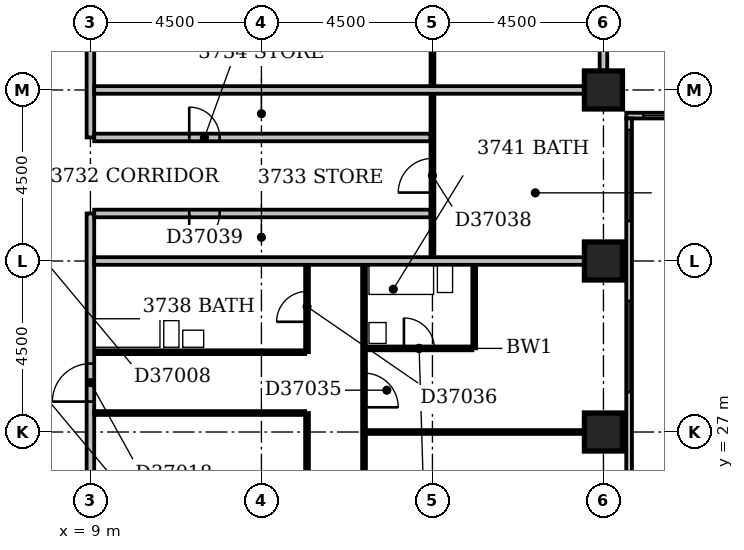
"""IFC4 building model, lengths in metres.
Left out: names, types, materials, properties, quantities, classifications, styles, units other than length and angle.
Written with IfcOpenShell. Run it as: python <this file> out.ifc"""

import sys

from ifc_helpers import new_model, si_unit, direction, frame, frame_2d, origin, origin_2d, place, context, subcontext, project, spatial, rectangle, extrude, element, fill, save


model = new_model("IFC4")
c1 = context("Model", 3, precision=1e-05, world=origin(), true_north=direction((0.0, 1.0)))
c2 = subcontext(c1, "Body", "Model", "MODEL_VIEW")
j1 = project(units=[si_unit("LENGTHUNIT", "METRE"), si_unit("PLANEANGLEUNIT", "RADIAN")], contexts=[c1])
p1 = place(None, origin())
s1 = spatial("IfcSite", under=j1, at=p1, CompositionType="ELEMENT")
p2 = place(p1, origin())
s2 = spatial("IfcBuilding", under=s1, at=p2, CompositionType="ELEMENT")
p3 = place(p2, frame((0.0, 0.0, 148.4)))
s3 = spatial("IfcBuildingStorey", under=s2, at=p3, CompositionType="ELEMENT", Elevation=148.4)
for number, where, z_axis, x_axis in (
    (1, (22.5, 27.0, -0.3), (0.0, 0.0, 1.0), (1.0, 0.0, 0.0)),
    (2, (22.5, 31.5, -0.3), (0.0, 0.0, 1.0), (1.0, 0.0, 0.0)),
    (3, (22.5, 36.0, -0.3), (0.0, 0.0, 1.0), (1.0, 0.0, 0.0)),
):
    element("IfcColumn", number, at=place(p3, frame(where, z_axis=z_axis, x_axis=x_axis)), inside=s3, PredefinedType="COLUMN", context=c2, shape_type="SweptSolid", body=[
        extrude(rectangle(XDim=1.0, YDim=1.0, at=origin_2d()), origin(), (0.0, 0.0, 1.0), 3.6),
    ])
p4 = place(p3, frame((23.175, 17.4, 0.0), z_axis=(0.0, 0.0, 1.0), x_axis=(0.0, 1.0, 0.0)))
e4 = element("IfcWall", 4, at=p4, inside=s3, PredefinedType="STANDARD", context=c2, shape_type="SweptSolid", body=[
    extrude(rectangle(XDim=17.85, YDim=0.15, at=frame_2d((8.925, 0.0))), origin(), (0.0, 0.0, 1.0), 2.7),
])
p5 = place(p4, frame((1.65, 0.0, 0.6)))
e5 = element("IfcOpeningElement", 5, at=p5, cuts=e4, PredefinedType="OPENING", context=c2, shape_type="SweptSolid", body=[
    extrude(rectangle(XDim=2.4, YDim=1.8, at=frame_2d((1.2, 0.9))), frame((0.0, 0.087, 0.0), z_axis=(0.0, -1.0, 0.0), x_axis=(1.0, 0.0, 0.0)), (0.0, 0.0, 1.0), 0.174),
])
p6 = place(p4, frame((5.848, 0.0, 0.6)))
e6 = element("IfcOpeningElement", 6, at=p6, cuts=e4, PredefinedType="OPENING", context=c2, shape_type="SweptSolid", body=[
    extrude(rectangle(XDim=0.9, YDim=1.8, at=frame_2d((0.45, 0.9))), frame((0.0, 0.087, 0.0), z_axis=(0.0, -1.0, 0.0), x_axis=(1.0, 0.0, 0.0)), (0.0, 0.0, 1.0), 0.174),
])
p7 = place(p4, frame((10.65, 0.0, 0.6)))
e7 = element("IfcOpeningElement", 7, at=p7, cuts=e4, PredefinedType="OPENING", context=c2, shape_type="SweptSolid", body=[
    extrude(rectangle(XDim=2.4, YDim=1.8, at=frame_2d((1.2, 0.9))), frame((0.0, 0.087, 0.0), z_axis=(0.0, -1.0, 0.0), x_axis=(1.0, 0.0, 0.0)), (0.0, 0.0, 1.0), 0.174),
])
p8 = place(p4, frame((15.15, 0.0, 0.6)))
e8 = element("IfcOpeningElement", 8, at=p8, cuts=e4, PredefinedType="OPENING", context=c2, shape_type="SweptSolid", body=[
    extrude(rectangle(XDim=2.4, YDim=1.8, at=frame_2d((1.2, 0.9))), frame((0.0, 0.087, 0.0), z_axis=(0.0, -1.0, 0.0), x_axis=(1.0, 0.0, 0.0)), (0.0, 0.0, 1.0), 0.174),
])
p9 = place(p3, frame((23.1, 35.325, 0.0), z_axis=(0.0, 0.0, 1.0), x_axis=(1.0, 0.0, 0.0)))
e9 = element("IfcWall", 9, at=p9, inside=s3, PredefinedType="STANDARD", context=c2, shape_type="SweptSolid", body=[
    extrude(rectangle(XDim=45.15, YDim=0.15, at=frame_2d((22.575, 0.0))), origin(), (0.0, 0.0, 1.0), 2.7),
])
p10 = place(p9, frame((0.45, 0.0, 0.6)))
e10 = element("IfcOpeningElement", 10, at=p10, cuts=e9, PredefinedType="OPENING", context=c2, shape_type="SweptSolid", body=[
    extrude(rectangle(XDim=2.4, YDim=1.8, at=frame_2d((1.2, 0.9))), frame((0.0, 0.087, 0.0), z_axis=(0.0, -1.0, 0.0), x_axis=(1.0, 0.0, 0.0)), (0.0, 0.0, 1.0), 0.174),
])
p11 = place(p9, frame((6.711, 0.0, 0.6)))
e11 = element("IfcOpeningElement", 11, at=p11, cuts=e9, PredefinedType="OPENING", context=c2, shape_type="SweptSolid", body=[
    extrude(rectangle(XDim=0.9, YDim=1.8, at=frame_2d((0.45, 0.9))), frame((0.0, 0.087, 0.0), z_axis=(0.0, -1.0, 0.0), x_axis=(1.0, 0.0, 0.0)), (0.0, 0.0, 1.0), 0.174),
])
p12 = place(p9, frame((9.45, 0.0, 0.6)))
e12 = element("IfcOpeningElement", 12, at=p12, cuts=e9, PredefinedType="OPENING", context=c2, shape_type="SweptSolid", body=[
    extrude(rectangle(XDim=2.4, YDim=1.8, at=frame_2d((1.2, 0.9))), frame((0.0, 0.087, 0.0), z_axis=(0.0, -1.0, 0.0), x_axis=(1.0, 0.0, 0.0)), (0.0, 0.0, 1.0), 0.174),
])
p13 = place(p9, frame((13.95, 0.0, 0.6)))
e13 = element("IfcOpeningElement", 13, at=p13, cuts=e9, PredefinedType="OPENING", context=c2, shape_type="SweptSolid", body=[
    extrude(rectangle(XDim=2.4, YDim=1.8, at=frame_2d((1.2, 0.9))), frame((0.0, 0.087, 0.0), z_axis=(0.0, -1.0, 0.0), x_axis=(1.0, 0.0, 0.0)), (0.0, 0.0, 1.0), 0.174),
])
p14 = place(p9, frame((18.153, 0.0, 0.6)))
e14 = element("IfcOpeningElement", 14, at=p14, cuts=e9, PredefinedType="OPENING", context=c2, shape_type="SweptSolid", body=[
    extrude(rectangle(XDim=1.5, YDim=1.8, at=frame_2d((0.75, 0.9))), frame((0.0, 0.087, 0.0), z_axis=(0.0, -1.0, 0.0), x_axis=(1.0, 0.0, 0.0)), (0.0, 0.0, 1.0), 0.174),
])
p15 = place(p9, frame((22.95, 0.0, 0.6)))
e15 = element("IfcOpeningElement", 15, at=p15, cuts=e9, PredefinedType="OPENING", context=c2, shape_type="SweptSolid", body=[
    extrude(rectangle(XDim=2.4, YDim=1.8, at=frame_2d((1.2, 0.9))), frame((0.0, 0.087, 0.0), z_axis=(0.0, -1.0, 0.0), x_axis=(1.0, 0.0, 0.0)), (0.0, 0.0, 1.0), 0.174),
])
p16 = place(p9, frame((27.45, 0.0, 0.6)))
e16 = element("IfcOpeningElement", 16, at=p16, cuts=e9, PredefinedType="OPENING", context=c2, shape_type="SweptSolid", body=[
    extrude(rectangle(XDim=2.4, YDim=1.8, at=frame_2d((1.2, 0.9))), frame((0.0, 0.087, 0.0), z_axis=(0.0, -1.0, 0.0), x_axis=(1.0, 0.0, 0.0)), (0.0, 0.0, 1.0), 0.174),
])
p17 = place(p9, frame((31.689, 0.0, 0.6)))
e17 = element("IfcOpeningElement", 17, at=p17, cuts=e9, PredefinedType="OPENING", context=c2, shape_type="SweptSolid", body=[
    extrude(rectangle(XDim=1.2, YDim=1.8, at=frame_2d((0.6, 0.9))), frame((0.0, 0.087, 0.0), z_axis=(0.0, -1.0, 0.0), x_axis=(1.0, 0.0, 0.0)), (0.0, 0.0, 1.0), 0.174),
])
p18 = place(p9, frame((36.45, 0.0, 0.6)))
e18 = element("IfcOpeningElement", 18, at=p18, cuts=e9, PredefinedType="OPENING", context=c2, shape_type="SweptSolid", body=[
    extrude(rectangle(XDim=2.4, YDim=1.8, at=frame_2d((1.2, 0.9))), frame((0.0, 0.087, 0.0), z_axis=(0.0, -1.0, 0.0), x_axis=(1.0, 0.0, 0.0)), (0.0, 0.0, 1.0), 0.174),
])
p19 = place(p9, frame((40.95, 0.0, 0.6)))
e19 = element("IfcOpeningElement", 19, at=p19, cuts=e9, PredefinedType="OPENING", context=c2, shape_type="SweptSolid", body=[
    extrude(rectangle(XDim=2.4, YDim=1.8, at=frame_2d((1.2, 0.9))), frame((0.0, 0.087, 0.0), z_axis=(0.0, -1.0, 0.0), x_axis=(1.0, 0.0, 0.0)), (0.0, 0.0, 1.0), 0.174),
])
p20 = place(p3, frame((9.0, 5.0, 0.0), z_axis=(0.0, 0.0, 1.0), x_axis=(0.0, 1.0, 0.0)))
e20 = element("IfcWall", 20, at=p20, inside=s3, PredefinedType="PARTITIONING", context=c2, shape_type="SweptSolid", body=[
    extrude(rectangle(XDim=27.75, YDim=0.2, at=frame_2d((13.875, 0.0))), origin(), (0.0, 0.0, 1.0), 3.3),
])
p21 = place(p20, frame((22.8, 0.0, 0.0)))
e21 = element("IfcOpeningElement", 21, at=p21, cuts=e20, PredefinedType="OPENING", context=c2, shape_type="SweptSolid", body=[
    extrude(rectangle(XDim=1.0, YDim=2.1, at=frame_2d((0.5, 1.05))), frame((0.0, 0.112, 0.0), z_axis=(0.0, -1.0, 0.0), x_axis=(1.0, 0.0, 0.0)), (0.0, 0.0, 1.0), 0.224),
])
p22 = place(p20, frame((14.95, 0.0, 0.0)))
e22 = element("IfcOpeningElement", 22, at=p22, cuts=e20, PredefinedType="OPENING", context=c2, shape_type="SweptSolid", body=[
    extrude(rectangle(XDim=1.0, YDim=2.1, at=frame_2d((0.5, 1.05))), frame((0.0, 0.112, 0.0), z_axis=(0.0, -1.0, 0.0), x_axis=(1.0, 0.0, 0.0)), (0.0, 0.0, 1.0), 0.224),
])
p23 = place(p20, frame((10.45, 0.0, 0.0)))
e23 = element("IfcOpeningElement", 23, at=p23, cuts=e20, PredefinedType="OPENING", context=c2, shape_type="SweptSolid", body=[
    extrude(rectangle(XDim=1.0, YDim=2.1, at=frame_2d((0.5, 1.05))), frame((0.0, 0.112, 0.0), z_axis=(0.0, -1.0, 0.0), x_axis=(1.0, 0.0, 0.0)), (0.0, 0.0, 1.0), 0.224),
])
p24 = place(p20, frame((5.95, 0.0, 0.0)))
e24 = element("IfcOpeningElement", 24, at=p24, cuts=e20, PredefinedType="OPENING", context=c2, shape_type="SweptSolid", body=[
    extrude(rectangle(XDim=1.0, YDim=2.1, at=frame_2d((0.5, 1.05))), frame((0.0, 0.112, 0.0), z_axis=(0.0, -1.0, 0.0), x_axis=(1.0, 0.0, 0.0)), (0.0, 0.0, 1.0), 0.224),
])
p25 = place(p20, frame((1.5, 0.0, 0.0)))
e25 = element("IfcOpeningElement", 25, at=p25, cuts=e20, PredefinedType="OPENING", context=c2, shape_type="SweptSolid", body=[
    extrude(rectangle(XDim=0.9, YDim=2.1, at=frame_2d((0.45, 1.05))), frame((0.0, 0.112, 0.0), z_axis=(0.0, -1.0, 0.0), x_axis=(1.0, 0.0, 0.0)), (0.0, 0.0, 1.0), 0.224),
])
p26 = place(p3, frame((14.7, 22.6, 0.0), z_axis=(0.0, 0.0, 1.0), x_axis=(0.0, 1.0, 0.0)))
e26 = element("IfcWall", 26, at=p26, inside=s3, PredefinedType="PARTITIONING", context=c2, shape_type="SweptSolid", body=[
    extrude(rectangle(XDim=4.9, YDim=0.1, at=frame_2d((2.45, 0.0))), origin(), (0.0, 0.0, 1.0), 3.3),
])
p27 = place(p26, frame((1.95, 0.0, 0.0)))
e27 = element("IfcOpeningElement", 27, at=p27, cuts=e26, PredefinedType="OPENING", context=c2, shape_type="SweptSolid", body=[
    extrude(rectangle(XDim=0.9, YDim=2.1, at=frame_2d((0.45, 1.05))), frame((0.0, 0.062, 0.0), z_axis=(0.0, -1.0, 0.0), x_axis=(1.0, 0.0, 0.0)), (0.0, 0.0, 1.0), 0.124),
])
p28 = place(p3, frame((16.2, 22.6, 0.0), z_axis=(0.0, 0.0, 1.0), x_axis=(0.0, 1.0, 0.0)))
e28 = element("IfcWall", 28, at=p28, inside=s3, PredefinedType="PARTITIONING", context=c2, shape_type="SweptSolid", body=[
    extrude(rectangle(XDim=8.8, YDim=0.1, at=frame_2d((4.4, 0.0))), origin(), (0.0, 0.0, 1.0), 3.3),
])
p29 = place(p28, frame((1.7, 0.0, 0.0)))
e29 = element("IfcOpeningElement", 29, at=p29, cuts=e28, PredefinedType="OPENING", context=c2, shape_type="SweptSolid", body=[
    extrude(rectangle(XDim=0.9, YDim=2.1, at=frame_2d((0.45, 1.05))), frame((0.0, 0.062, 0.0), z_axis=(0.0, -1.0, 0.0), x_axis=(1.0, 0.0, 0.0)), (0.0, 0.0, 1.0), 0.124),
])
p30 = place(p28, frame((5.05, 0.0, 0.0)))
e30 = element("IfcOpeningElement", 30, at=p30, cuts=e28, PredefinedType="OPENING", context=c2, shape_type="SweptSolid", body=[
    extrude(rectangle(XDim=0.9, YDim=2.1, at=frame_2d((0.45, 1.05))), frame((0.0, 0.062, 0.0), z_axis=(0.0, -1.0, 0.0), x_axis=(1.0, 0.0, 0.0)), (0.0, 0.0, 1.0), 0.124),
])
p31 = place(p3, frame((16.25, 27.0, 0.0), z_axis=(0.0, 0.0, 1.0), x_axis=(1.0, 0.0, 0.0)))
e31 = element("IfcWall", 31, at=p31, inside=s3, PredefinedType="PARTITIONING", context=c2, shape_type="SweptSolid", body=[
    extrude(rectangle(XDim=5.75, YDim=0.1, at=frame_2d((2.875, 0.0))), origin(), (0.0, 0.0, 1.0), 2.7),
])
p32 = place(p3, frame((9.1, 27.5, 0.0), z_axis=(0.0, 0.0, 1.0), x_axis=(1.0, 0.0, 0.0)))
e32 = element("IfcWall", 32, at=p32, inside=s3, PredefinedType="PARTITIONING", context=c2, shape_type="SweptSolid", body=[
    extrude(rectangle(XDim=5.55, YDim=0.1, at=frame_2d((2.775, 0.0))), origin(), (0.0, 0.0, 1.0), 2.7),
])
p33 = place(p3, frame((9.1, 29.1, 0.0), z_axis=(0.0, 0.0, 1.0), x_axis=(1.0, 0.0, 0.0)))
e33 = element("IfcWall", 33, at=p33, inside=s3, PredefinedType="PLUMBINGWALL", context=c2, shape_type="SweptSolid", body=[
    extrude(rectangle(XDim=5.55, YDim=0.1, at=frame_2d((2.775, 0.0))), origin(), (0.0, 0.0, 1.0), 3.3),
])
p34 = place(p3, frame((14.7, 29.1, 0.0), z_axis=(0.0, 0.0, 1.0), x_axis=(0.0, 1.0, 0.0)))
e34 = element("IfcWall", 34, at=p34, inside=s3, PredefinedType="PARTITIONING", context=c2, shape_type="SweptSolid", body=[
    extrude(rectangle(XDim=2.3, YDim=0.1, at=frame_2d((1.15, 0.0))), origin(), (0.0, 0.0, 1.0), 3.3),
])
p35 = place(p34, frame((0.8, 0.0, 0.0)))
e35 = element("IfcOpeningElement", 35, at=p35, cuts=e34, PredefinedType="OPENING", context=c2, shape_type="SweptSolid", body=[
    extrude(rectangle(XDim=0.8, YDim=2.1, at=frame_2d((0.4, 1.05))), frame((0.0, 0.062, 0.0), z_axis=(0.0, -1.0, 0.0), x_axis=(1.0, 0.0, 0.0)), (0.0, 0.0, 1.0), 0.124),
])
p36 = place(p3, frame((16.25, 29.2, 0.0), z_axis=(0.0, 0.0, 1.0), x_axis=(1.0, 0.0, 0.0)))
e36 = element("IfcWall", 36, at=p36, inside=s3, PredefinedType="PLUMBINGWALL", context=c2, shape_type="SweptSolid", body=[
    extrude(rectangle(XDim=2.8, YDim=0.1, at=frame_2d((1.4, 0.0))), origin(), (0.0, 0.0, 1.0), 3.3),
])
p37 = place(p36, frame((1.0, 0.0, 0.0)))
e37 = element("IfcOpeningElement", 37, at=p37, cuts=e36, PredefinedType="OPENING", context=c2, shape_type="SweptSolid", body=[
    extrude(rectangle(XDim=0.8, YDim=2.1, at=frame_2d((0.4, 1.05))), frame((0.0, 0.062, 0.0), z_axis=(0.0, -1.0, 0.0), x_axis=(1.0, 0.0, 0.0)), (0.0, 0.0, 1.0), 0.124),
])
p38 = place(p3, frame((19.1, 29.2, 0.0), z_axis=(0.0, 0.0, 1.0), x_axis=(0.0, 1.0, 0.0)))
e38 = element("IfcWall", 38, at=p38, inside=s3, PredefinedType="PLUMBINGWALL", context=c2, shape_type="SweptSolid", body=[
    extrude(rectangle(XDim=2.2, YDim=0.1, at=frame_2d((1.1, 0.0))), origin(), (0.0, 0.0, 1.0), 3.3),
])
p39 = place(p3, frame((9.1, 31.5, 0.0), z_axis=(0.0, 0.0, 1.0), x_axis=(1.0, 0.0, 0.0)))
e39 = element("IfcWall", 39, at=p39, inside=s3, PredefinedType="PARTITIONING", context=c2, shape_type="SweptSolid", body=[
    extrude(rectangle(XDim=12.9, YDim=0.2, at=frame_2d((6.45, 0.0))), origin(), (0.0, 0.0, 1.0), 3.3),
])
p40 = place(p3, frame((18.0, 31.6, 0.0), z_axis=(0.0, 0.0, 1.0), x_axis=(0.0, 1.0, 0.0)))
e40 = element("IfcWall", 40, at=p40, inside=s3, PredefinedType="PARTITIONING", context=c2, shape_type="SweptSolid", body=[
    extrude(rectangle(XDim=17.8, YDim=0.1, at=frame_2d((8.9, 0.0))), origin(), (0.0, 0.0, 1.0), 3.3),
])
p41 = place(p40, frame((1.7, 0.0, 0.0)))
e41 = element("IfcOpeningElement", 41, at=p41, cuts=e40, PredefinedType="OPENING", context=c2, shape_type="SweptSolid", body=[
    extrude(rectangle(XDim=0.9, YDim=2.1, at=frame_2d((0.45, 1.05))), frame((0.0, 0.062, 0.0), z_axis=(0.0, -1.0, 0.0), x_axis=(1.0, 0.0, 0.0)), (0.0, 0.0, 1.0), 0.124),
])
p42 = place(p3, frame((9.1, 32.75, 0.0), z_axis=(0.0, 0.0, 1.0), x_axis=(1.0, 0.0, 0.0)))
e42 = element("IfcWall", 42, at=p42, inside=s3, PredefinedType="PARTITIONING", context=c2, shape_type="SweptSolid", body=[
    extrude(rectangle(XDim=8.85, YDim=0.2, at=frame_2d((4.425, 0.0))), origin(), (0.0, 0.0, 1.0), 3.3),
])
p43 = place(p42, frame((2.5, 0.0, 0.0)))
e43 = element("IfcOpeningElement", 43, at=p43, cuts=e42, PredefinedType="OPENING", context=c2, shape_type="SweptSolid", body=[
    extrude(rectangle(XDim=0.8, YDim=2.1, at=frame_2d((0.4, 1.05))), frame((0.0, 0.112, 0.0), z_axis=(0.0, -1.0, 0.0), x_axis=(1.0, 0.0, 0.0)), (0.0, 0.0, 1.0), 0.224),
])
p44 = place(p3, frame((9.0, 34.75, 0.0), z_axis=(0.0, 0.0, 1.0), x_axis=(0.0, 1.0, 0.0)))
e44 = element("IfcWall", 44, at=p44, inside=s3, PredefinedType="PARTITIONING", context=c2, shape_type="SweptSolid", body=[
    extrude(rectangle(XDim=14.75, YDim=0.2, at=frame_2d((7.375, 0.0))), origin(), (0.0, 0.0, 1.0), 3.3),
])
p45 = place(p44, frame((7.5, 0.0, 0.0)))
e45 = element("IfcOpeningElement", 45, at=p45, cuts=e44, PredefinedType="OPENING", context=c2, shape_type="SweptSolid", body=[
    extrude(rectangle(XDim=0.9, YDim=2.1, at=frame_2d((0.45, 1.05))), frame((0.0, 0.112, 0.0), z_axis=(0.0, -1.0, 0.0), x_axis=(1.0, 0.0, 0.0)), (0.0, 0.0, 1.0), 0.224),
])
p46 = place(p3, frame((9.1, 34.75, 0.0), z_axis=(0.0, 0.0, 1.0), x_axis=(1.0, 0.0, 0.0)))
e46 = element("IfcWall", 46, at=p46, inside=s3, PredefinedType="PARTITIONING", context=c2, shape_type="SweptSolid", body=[
    extrude(rectangle(XDim=8.85, YDim=0.2, at=frame_2d((4.425, 0.0))), origin(), (0.0, 0.0, 1.0), 3.3),
])
p47 = place(p46, frame((2.5, 0.0, 0.0)))
e47 = element("IfcOpeningElement", 47, at=p47, cuts=e46, PredefinedType="OPENING", context=c2, shape_type="SweptSolid", body=[
    extrude(rectangle(XDim=0.8, YDim=2.1, at=frame_2d((0.4, 1.05))), frame((0.0, 0.112, 0.0), z_axis=(0.0, -1.0, 0.0), x_axis=(1.0, 0.0, 0.0)), (0.0, 0.0, 1.0), 0.224),
])
for number, where, z_axis, x_axis in (
    (48, (9.1, 36.0, 0.0), (0.0, 0.0, 1.0), (1.0, 0.0, 0.0)),
    (49, (22.5, 36.5, 0.0), (0.0, 0.0, 1.0), (0.0, 1.0, 0.0)),
):
    element("IfcWall", number, at=place(p3, frame(where, z_axis=z_axis, x_axis=x_axis)), inside=s3, PredefinedType="PARTITIONING", context=c2, shape_type="SweptSolid", body=[
        extrude(rectangle(XDim=12.9, YDim=0.2, at=frame_2d((6.45, 0.0))), origin(), (0.0, 0.0, 1.0), 3.3),
    ])
p48 = place(p7, origin())
e50 = element("IfcWindow", 50, at=p48, inside=s3, PartitioningType="SINGLE_PANEL", PredefinedType="WINDOW", context=c2, shape_type="SweptSolid", body=[
    extrude(rectangle(XDim=2.4, YDim=1.8, at=frame_2d((1.2, 0.9))), frame((0.0, 0.03, 0.0), z_axis=(0.0, -1.0, 0.0), x_axis=(1.0, 0.0, 0.0)), (0.0, 0.0, 1.0), 0.06),
])
fill(e7, e50)
p49 = place(p8, origin())
e51 = element("IfcWindow", 51, at=p49, inside=s3, PartitioningType="SINGLE_PANEL", PredefinedType="WINDOW", context=c2, shape_type="SweptSolid", body=[
    extrude(rectangle(XDim=2.4, YDim=1.8, at=frame_2d((1.2, 0.9))), frame((0.0, 0.03, 0.0), z_axis=(0.0, -1.0, 0.0), x_axis=(1.0, 0.0, 0.0)), (0.0, 0.0, 1.0), 0.06),
])
fill(e8, e51)
p50 = place(p10, origin())
e52 = element("IfcWindow", 52, at=p50, inside=s3, PartitioningType="SINGLE_PANEL", PredefinedType="WINDOW", context=c2, shape_type="SweptSolid", body=[
    extrude(rectangle(XDim=2.4, YDim=1.8, at=frame_2d((1.2, 0.9))), frame((0.0, 0.03, 0.0), z_axis=(0.0, -1.0, 0.0), x_axis=(1.0, 0.0, 0.0)), (0.0, 0.0, 1.0), 0.06),
])
fill(e10, e52)
p51 = place(p21, origin())
e53 = element("IfcDoor", 53, at=p51, inside=s3, OperationType="SINGLE_SWING_LEFT", PredefinedType="DOOR", context=c2, shape_type="SweptSolid", body=[
    extrude(rectangle(XDim=1.0, YDim=2.1, at=frame_2d((0.5, 1.05))), frame((0.0, 0.025, 0.0), z_axis=(0.0, -1.0, 0.0), x_axis=(1.0, 0.0, 0.0)), (0.0, 0.0, 1.0), 0.05),
])
fill(e21, e53)
p52 = place(p30, frame((0.9, 0.0, 0.0), z_axis=(0.0, 0.0, 1.0), x_axis=(-1.0, 0.0, 0.0)))
e54 = element("IfcDoor", 54, at=p52, inside=s3, OperationType="SINGLE_SWING_RIGHT", PredefinedType="DOOR", context=c2, shape_type="SweptSolid", body=[
    extrude(rectangle(XDim=0.9, YDim=2.1, at=frame_2d((0.45, 1.05))), frame((0.0, 0.025, 0.0), z_axis=(0.0, -1.0, 0.0), x_axis=(1.0, 0.0, 0.0)), (0.0, 0.0, 1.0), 0.05),
])
fill(e30, e54)
p53 = place(p35, origin())
e55 = element("IfcDoor", 55, at=p53, inside=s3, OperationType="SINGLE_SWING_LEFT", PredefinedType="DOOR", context=c2, shape_type="SweptSolid", body=[
    extrude(rectangle(XDim=0.8, YDim=2.1, at=frame_2d((0.4, 1.05))), frame((0.0, 0.025, 0.0), z_axis=(0.0, -1.0, 0.0), x_axis=(1.0, 0.0, 0.0)), (0.0, 0.0, 1.0), 0.05),
])
fill(e35, e55)
p54 = place(p37, origin())
e56 = element("IfcDoor", 56, at=p54, inside=s3, OperationType="SINGLE_SWING_LEFT", PredefinedType="DOOR", context=c2, shape_type="SweptSolid", body=[
    extrude(rectangle(XDim=0.8, YDim=2.1, at=frame_2d((0.4, 1.05))), frame((0.0, 0.025, 0.0), z_axis=(0.0, -1.0, 0.0), x_axis=(1.0, 0.0, 0.0)), (0.0, 0.0, 1.0), 0.05),
])
fill(e37, e56)
p55 = place(p41, origin())
e57 = element("IfcDoor", 57, at=p55, inside=s3, OperationType="SINGLE_SWING_LEFT", PredefinedType="DOOR", context=c2, shape_type="SweptSolid", body=[
    extrude(rectangle(XDim=0.9, YDim=2.1, at=frame_2d((0.45, 1.05))), frame((0.0, 0.025, 0.0), z_axis=(0.0, -1.0, 0.0), x_axis=(1.0, 0.0, 0.0)), (0.0, 0.0, 1.0), 0.05),
])
fill(e41, e57)
p56 = place(p43, frame((0.8, 0.0, 0.0), z_axis=(0.0, 0.0, 1.0), x_axis=(-1.0, 0.0, 0.0)))
e58 = element("IfcDoor", 58, at=p56, inside=s3, OperationType="SINGLE_SWING_RIGHT", PredefinedType="DOOR", context=c2, shape_type="SweptSolid", body=[
    extrude(rectangle(XDim=0.8, YDim=2.1, at=frame_2d((0.4, 1.05))), frame((0.0, 0.025, 0.0), z_axis=(0.0, -1.0, 0.0), x_axis=(1.0, 0.0, 0.0)), (0.0, 0.0, 1.0), 0.05),
])
fill(e43, e58)
p57 = place(p47, origin())
e59 = element("IfcDoor", 59, at=p57, inside=s3, OperationType="SINGLE_SWING_LEFT", PredefinedType="DOOR", context=c2, shape_type="SweptSolid", body=[
    extrude(rectangle(XDim=0.8, YDim=2.1, at=frame_2d((0.4, 1.05))), frame((0.0, 0.025, 0.0), z_axis=(0.0, -1.0, 0.0), x_axis=(1.0, 0.0, 0.0)), (0.0, 0.0, 1.0), 0.05),
])
fill(e47, e59)
save(model, sys.argv[1])
